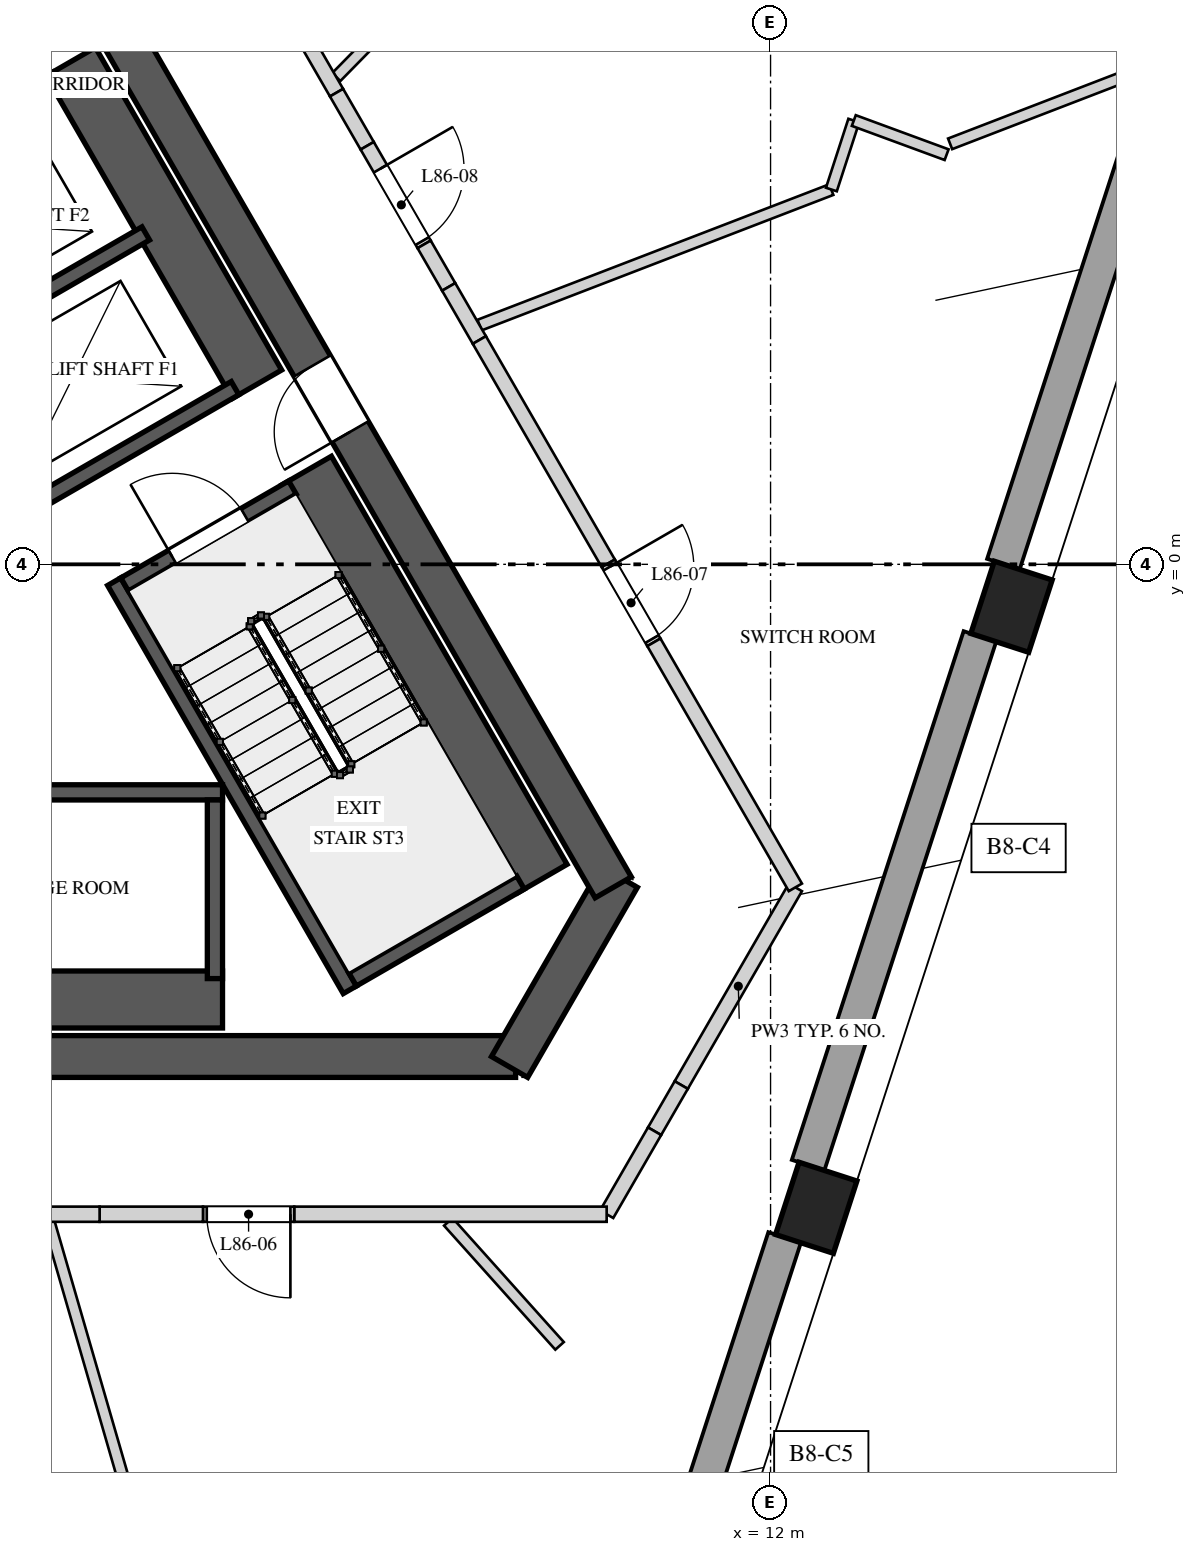
"""IFC4 building model, lengths in metres.
Left out: names, types, materials, properties, quantities, classifications, styles, units other than length and angle.
Written with IfcOpenShell. Run it as: python <this file> out.ifc"""

import sys

from ifc_helpers import new_model, si_unit, direction, frame, frame_2d, origin, origin_2d, place, context, subcontext, project, spatial, polyline, rectangle, outline, extrude, element, fill, save


model = new_model("IFC4")
c1 = context("Model", 3, precision=1e-05, world=origin(), true_north=direction((0.0, 1.0)))
c2 = subcontext(c1, "Body", "Model", "MODEL_VIEW")
j1 = project(units=[si_unit("LENGTHUNIT", "METRE"), si_unit("PLANEANGLEUNIT", "RADIAN")], contexts=[c1])
p1 = place(None, origin())
s1 = spatial("IfcSite", under=j1, at=p1, CompositionType="ELEMENT")
p2 = place(p1, origin())
s2 = spatial("IfcBuilding", under=s1, at=p2, CompositionType="ELEMENT")
p3 = place(p2, frame((0.0, 0.0, 374.9)))
s3 = spatial("IfcBuildingStorey", under=s2, at=p3, CompositionType="ELEMENT", Elevation=374.9)
p4 = place(p3, frame((-8.646, -6.475, 0.0), z_axis=(0.0, 0.0, 1.0), x_axis=(1.0, 0.0, 0.0)))
e1 = element("IfcWall", 1, at=p4, inside=s3, PredefinedType="SHEAR", context=c2, shape_type="SweptSolid", body=[
    extrude(rectangle(XDim=17.292, YDim=0.55, at=frame_2d((8.646, 0.0))), origin(), (0.0, 0.0, 1.0), 6.0),
])
p5 = place(p4, frame((6.851, 0.0, 0.0)))
e2 = element("IfcOpeningElement", 2, at=p5, cuts=e1, PredefinedType="OPENING", context=c2, shape_type="SweptSolid", body=[
    extrude(rectangle(XDim=1.0, YDim=2.4, at=frame_2d((0.5, 1.2))), frame((0.0, 0.285, 0.0), z_axis=(0.0, -1.0, 0.0), x_axis=(1.0, 0.0, 0.0)), (0.0, 0.0, 1.0), 0.57),
])
p6 = place(p3, frame((8.566, -6.613, 0.0), z_axis=(0.0, 0.0, 1.0), x_axis=(0.499995765644, 0.866027848477, 0.0)))
e3 = element("IfcWall", 3, at=p6, inside=s3, PredefinedType="SHEAR", context=c2, shape_type="SweptSolid", body=[
    extrude(rectangle(XDim=2.887, YDim=0.55, at=frame_2d((1.443, 0.0))), origin(), (0.0, 0.0, 1.0), 6.0),
])
p7 = place(p3, frame((9.93, -4.25, 0.0), z_axis=(0.0, 0.0, 1.0), x_axis=(-0.499994590896, 0.86602852671, 0.0)))
e4 = element("IfcWall", 4, at=p7, inside=s3, PredefinedType="SHEAR", context=c2, shape_type="SweptSolid", body=[
    extrude(rectangle(XDim=17.292, YDim=0.55, at=frame_2d((8.646, 0.0))), origin(), (0.0, 0.0, 1.0), 6.0),
])
p8 = place(p7, frame((6.921, 0.0, 0.0)))
e5 = element("IfcOpeningElement", 5, at=p8, cuts=e4, PredefinedType="OPENING", context=c2, shape_type="SweptSolid", body=[
    extrude(rectangle(XDim=1.0, YDim=2.4, at=frame_2d((0.5, 1.2))), frame((0.0, 0.285, 0.0), z_axis=(0.0, -1.0, 0.0), x_axis=(1.0, 0.0, 0.0)), (0.0, 0.0, 1.0), 0.57),
])
for number, where, z_axis, x_axis in (
    (6, (12.601, -8.465, 0.0), (0.0, 0.0, 1.0), (0.309, 0.951, 0.0)),
    (7, (15.17, -0.558, 0.0), (0.0, 0.0, 1.0), (0.309, 0.951, 0.0)),
):
    element("IfcColumn", number, at=place(p3, frame(where, z_axis=z_axis, x_axis=x_axis)), inside=s3, PredefinedType="COLUMN", context=c2, shape_type="SweptSolid", body=[
        extrude(rectangle(XDim=1.0, YDim=0.8, at=origin_2d()), origin(), (0.0, 0.0, 1.0), 6.0),
    ])
for number, where, z_axis, x_axis in (
    (8, (9.925, -15.812, 0.0), (0.0, 0.0, 1.0), (0.309, 0.951, 0.0)),
    (9, (12.494, -7.905, 0.0), (0.0, 0.0, 1.0), (0.309, 0.951, 0.0)),
    (10, (15.063, 0.002, 0.0), (0.0, 0.0, 1.0), (0.309, 0.951, 0.0)),
):
    element("IfcWall", number, at=place(p3, frame(where, z_axis=z_axis, x_axis=x_axis)), inside=s3, PredefinedType="SOLIDWALL", context=c2, shape_type="SweptSolid", body=[
        extrude(rectangle(XDim=7.314, YDim=0.45, at=frame_2d((3.657, 0.0))), origin(), (0.0, 0.0, 1.0), 5.3),
    ])
p9 = place(p3, frame((8.998, -4.135, 0.0), z_axis=(0.0, 0.0, 1.0), x_axis=(-0.500009909098, 0.866019682689, 0.0)))
e11 = element("IfcWall", 11, at=p9, inside=s3, PredefinedType="SOLIDWALL", context=c2, shape_type="SweptSolid", body=[
    extrude(rectangle(XDim=6.2, YDim=0.75, at=frame_2d((3.1, 0.0))), origin(), (0.0, 0.0, 1.0), 5.65),
])
p10 = place(p3, frame((6.465, -5.597, 0.0), z_axis=(0.0, 0.0, 1.0), x_axis=(-0.49998037582, 0.866036733513, 0.0)))
e12 = element("IfcWall", 12, at=p10, inside=s3, PredefinedType="SOLIDWALL", context=c2, shape_type="SweptSolid", body=[
    extrude(rectangle(XDim=6.2, YDim=0.2, at=frame_2d((3.1, 0.0))), origin(), (0.0, 0.0, 1.0), 5.65),
])
p11 = place(p3, frame((6.501, -5.461, 0.0), z_axis=(0.0, 0.0, 1.0), x_axis=(0.865989465428, 0.500062241894, 0.0)))
e13 = element("IfcWall", 13, at=p11, inside=s3, PredefinedType="SOLIDWALL", context=c2, shape_type="SweptSolid", body=[
    extrude(rectangle(XDim=2.55, YDim=0.2, at=frame_2d((1.275, 0.0))), origin(), (0.0, 0.0, 1.0), 5.65),
])
p12 = place(p3, frame((3.501, -0.265, 0.0), z_axis=(0.0, 0.0, 1.0), x_axis=(0.866030925526, 0.499990435942, 0.0)))
e14 = element("IfcWall", 14, at=p12, inside=s3, PredefinedType="SOLIDWALL", context=c2, shape_type="SweptSolid", body=[
    extrude(rectangle(XDim=2.55, YDim=0.2, at=frame_2d((1.275, 0.0))), origin(), (0.0, 0.0, 1.0), 5.65),
])
p13 = place(p12, frame((0.725, 0.0, 0.0)))
e15 = element("IfcOpeningElement", 15, at=p13, cuts=e14, PredefinedType="OPENING", context=c2, shape_type="SweptSolid", body=[
    extrude(rectangle(XDim=1.1, YDim=2.4, at=frame_2d((0.55, 1.2))), frame((0.0, 0.11, 0.0), z_axis=(0.0, -1.0, 0.0), x_axis=(1.0, 0.0, 0.0)), (0.0, 0.0, 1.0), 0.22),
])
p14 = place(p3, frame((4.79, -3.0, 0.0), z_axis=(0.0, 0.0, 1.0), x_axis=(-1.0, 0.0, 0.0)))
e16 = element("IfcWall", 16, at=p14, inside=s3, PredefinedType="SOLIDWALL", context=c2, shape_type="SweptSolid", body=[
    extrude(rectangle(XDim=5.5, YDim=0.2, at=frame_2d((2.75, 0.0))), origin(), (0.0, 0.0, 1.0), 5.65),
])
p15 = place(p14, frame((2.275, 0.0, 0.0)))
e17 = element("IfcOpeningElement", 17, at=p15, cuts=e16, PredefinedType="OPENING", context=c2, shape_type="SweptSolid", body=[
    extrude(rectangle(XDim=0.95, YDim=2.4, at=frame_2d((0.475, 1.2))), frame((0.0, 0.11, 0.0), z_axis=(0.0, -1.0, 0.0), x_axis=(1.0, 0.0, 0.0)), (0.0, 0.0, 1.0), 0.22),
])
p16 = place(p3, frame((-0.71, -5.725, 0.0), z_axis=(0.0, 0.0, 1.0), x_axis=(1.0, 0.0, 0.0)))
e18 = element("IfcWall", 18, at=p16, inside=s3, PredefinedType="SOLIDWALL", context=c2, shape_type="SweptSolid", body=[
    extrude(rectangle(XDim=5.5, YDim=0.75, at=frame_2d((2.75, 0.0))), origin(), (0.0, 0.0, 1.0), 5.65),
])
p17 = place(p3, frame((4.69, -3.1, 0.0), z_axis=(0.0, 0.0, 1.0), x_axis=(0.0, -1.0, 0.0)))
e19 = element("IfcWall", 19, at=p17, inside=s3, PredefinedType="SOLIDWALL", context=c2, shape_type="SweptSolid", body=[
    extrude(rectangle(XDim=2.35, YDim=0.2, at=frame_2d((1.175, 0.0))), origin(), (0.0, 0.0, 1.0), 5.65),
])
p18 = place(p3, frame((5.243, 2.369, 0.0), z_axis=(0.0, 0.0, 1.0), x_axis=(-0.500002801628, 0.866023786258, 0.0)))
e20 = element("IfcWall", 20, at=p18, inside=s3, PredefinedType="SOLIDWALL", context=c2, shape_type="SweptSolid", body=[
    extrude(rectangle(XDim=4.9, YDim=0.75, at=frame_2d((2.45, 0.0))), origin(), (0.0, 0.0, 1.0), 5.65),
])
for number, where, z_axis, x_axis in (
    (21, (2.227, 0.743, 0.0), (0.0, 0.0, 1.0), (0.866, 0.5, 0.0)),
    (22, (1.052, 2.778, 0.0), (0.0, 0.0, 1.0), (0.866, 0.5, 0.0)),
    (23, (-0.123, 4.813, 0.0), (0.0, 0.0, 1.0), (0.866, 0.5, 0.0)),
):
    element("IfcWall", number, at=place(p3, frame(where, z_axis=z_axis, x_axis=x_axis)), inside=s3, PredefinedType="SOLIDWALL", context=c2, shape_type="SweptSolid", body=[
        extrude(rectangle(XDim=3.15, YDim=0.2, at=frame_2d((1.575, 0.0))), origin(), (0.0, 0.0, 1.0), 5.65),
    ])
p19 = place(p3, frame((2.505, -8.65, 0.0), z_axis=(0.0, 0.0, 1.0), x_axis=(0.278185386407, -0.960527402415, 0.0)))
e24 = element("IfcWall", 24, at=p19, inside=s3, PredefinedType="PARTITIONING", context=c2, shape_type="SweptSolid", body=[
    extrude(rectangle(XDim=9.173, YDim=0.15, at=frame_2d((4.586, 0.0))), origin(), (0.0, 0.0, 1.0), 4.55),
])
p20 = place(p3, frame((6.287, 6.411, 0.0), z_axis=(0.0, 0.0, 1.0), x_axis=(0.700152348121, 0.713993479956, 0.0)))
e25 = element("IfcWall", 25, at=p20, inside=s3, PredefinedType="PARTITIONING", context=c2, shape_type="SweptSolid", body=[
    extrude(rectangle(XDim=3.74, YDim=0.15, at=frame_2d((1.87, 0.0))), origin(), (0.0, 0.0, 1.0), 4.55),
])
p21 = place(p3, frame((7.76, -8.65, 0.0), z_axis=(0.0, 0.0, 1.0), x_axis=(0.667813245051, -0.744328872028, 0.0)))
e26 = element("IfcWall", 26, at=p21, inside=s3, PredefinedType="PARTITIONING", context=c2, shape_type="SweptSolid", body=[
    extrude(rectangle(XDim=2.192, YDim=0.15, at=frame_2d((1.096, 0.0))), origin(), (0.0, 0.0, 1.0), 5.65),
])
p22 = place(p3, frame((8.171, 3.147, 0.0), z_axis=(0.0, 0.0, 1.0), x_axis=(0.933160243697, 0.359460650953, 0.0)))
e27 = element("IfcWall", 27, at=p22, inside=s3, PredefinedType="PARTITIONING", context=c2, shape_type="SweptSolid", body=[
    extrude(rectangle(XDim=4.959, YDim=0.15, at=frame_2d((2.48, 0.0))), origin(), (0.0, 0.0, 1.0), 4.75),
])
p23 = place(p3, frame((12.8, 4.931, 0.0), z_axis=(0.0, 0.0, 1.0), x_axis=(0.30908028689, 0.951035948982, 0.0)))
e28 = element("IfcWall", 28, at=p23, inside=s3, PredefinedType="PARTITIONING", context=c2, shape_type="SweptSolid", body=[
    extrude(rectangle(XDim=0.954, YDim=0.15, at=frame_2d((0.477, 0.0))), origin(), (0.0, 0.0, 1.0), 4.75),
])
p24 = place(p3, frame((13.095, 5.839, 0.0), z_axis=(0.0, 0.0, 1.0), x_axis=(0.938493614459, -0.345296590803, 0.0)))
e29 = element("IfcWall", 29, at=p24, inside=s3, PredefinedType="PARTITIONING", context=c2, shape_type="SweptSolid", body=[
    extrude(rectangle(XDim=1.301, YDim=0.15, at=frame_2d((0.65, 0.0))), origin(), (0.0, 0.0, 1.0), 4.75),
])
p25 = place(p3, frame((14.363, 5.532, 0.0), z_axis=(0.0, 0.0, 1.0), x_axis=(0.933150029703, 0.359487165369, 0.0)))
e30 = element("IfcWall", 30, at=p25, inside=s3, PredefinedType="PARTITIONING", context=c2, shape_type="SweptSolid", body=[
    extrude(rectangle(XDim=2.769, YDim=0.15, at=frame_2d((1.384, 0.0))), origin(), (0.0, 0.0, 1.0), 5.65),
])
p26 = place(p3, frame((12.326, -4.25, 0.0), z_axis=(0.0, 0.0, 1.0), x_axis=(-0.500003959331, -0.866023117852, 0.0)))
e31 = element("IfcWall", 31, at=p26, inside=s3, PredefinedType="SOLIDWALL", context=c2, shape_type="SweptSolid", body=[
    extrude(rectangle(XDim=3.003, YDim=0.2, at=frame_2d((1.501, 0.0))), origin(), (0.0, 0.0, 1.0), 5.65),
])
p27 = place(p3, frame((10.825, -6.851, 0.0), z_axis=(0.0, 0.0, 1.0), x_axis=(-0.500144223137, -0.865942120504, 0.0)))
e32 = element("IfcWall", 32, at=p27, inside=s3, PredefinedType="SOLIDWALL", context=c2, shape_type="SweptSolid", body=[
    extrude(rectangle(XDim=0.701, YDim=0.2, at=frame_2d((0.351, 0.0))), origin(), (0.0, 0.0, 1.0), 4.95),
])
p28 = place(p3, frame((10.474, -7.458, 0.0), z_axis=(0.0, 0.0, 1.0), x_axis=(-0.499929168788, -0.866066294342, 0.0)))
e33 = element("IfcWall", 33, at=p28, inside=s3, PredefinedType="SOLIDWALL", context=c2, shape_type="SweptSolid", body=[
    extrude(rectangle(XDim=1.261, YDim=0.2, at=frame_2d((0.63, 0.0))), origin(), (0.0, 0.0, 1.0), 5.65),
])
p29 = place(p3, frame((9.844, -8.55, 0.0), z_axis=(0.0, 0.0, 1.0), x_axis=(-1.0, 0.0, 0.0)))
e34 = element("IfcWall", 34, at=p29, inside=s3, PredefinedType="SOLIDWALL", context=c2, shape_type="SweptSolid", body=[
    extrude(rectangle(XDim=4.111, YDim=0.2, at=frame_2d((2.055, 0.0))), origin(), (0.0, 0.0, 1.0), 5.65),
])
p30 = place(p3, frame((5.733, -8.55, 0.0), z_axis=(0.0, 0.0, 1.0), x_axis=(-1.0, 0.0, 0.0)))
e35 = element("IfcWall", 35, at=p30, inside=s3, PredefinedType="SOLIDWALL", context=c2, shape_type="SweptSolid", body=[
    extrude(outline(polyline([(0.0, 0.0), (1.2, 0.0), (1.2, 5.65), (0.905, 5.65), (0.905, 4.95), (0.0, 4.95), (0.0, 0.0)])), frame((0.0, 0.1, 0.0), z_axis=(0.0, -1.0, 0.0), x_axis=(1.0, 0.0, 0.0)), (0.0, 0.0, 1.0), 0.2),
])
p31 = place(p30, frame((0.05, 0.0, 0.0)))
e36 = element("IfcOpeningElement", 36, at=p31, cuts=e35, PredefinedType="OPENING", context=c2, shape_type="SweptSolid", body=[
    extrude(rectangle(XDim=1.1, YDim=2.4, at=frame_2d((0.55, 1.2))), frame((0.0, 0.11, 0.0), z_axis=(0.0, -1.0, 0.0), x_axis=(1.0, 0.0, 0.0)), (0.0, 0.0, 1.0), 0.22),
])
p32 = place(p3, frame((4.533, -8.55, 0.0), z_axis=(0.0, 0.0, 1.0), x_axis=(-1.0, 0.0, 0.0)))
e37 = element("IfcWall", 37, at=p32, inside=s3, PredefinedType="SOLIDWALL", context=c2, shape_type="SweptSolid", body=[
    extrude(rectangle(XDim=1.36, YDim=0.2, at=frame_2d((0.68, 0.0))), origin(), (0.0, 0.0, 1.0), 5.65),
])
for number, where, z_axis, x_axis in (
    (38, (3.173, -8.55, 0.0), (0.0, 0.0, 1.0), (-1.0, 0.0, 0.0)),
    (39, (5.818, 7.023, 0.0), (0.0, 0.0, 1.0), (0.5, -0.866, 0.0)),
):
    element("IfcWall", number, at=place(p3, frame(where, z_axis=z_axis, x_axis=x_axis)), inside=s3, PredefinedType="SOLIDWALL", context=c2, shape_type="SweptSolid", body=[
        extrude(rectangle(XDim=0.944, YDim=0.2, at=frame_2d((0.472, 0.0))), origin(), (0.0, 0.0, 1.0), 4.55),
    ])
p33 = place(p3, frame((6.29, 6.205, 0.0), z_axis=(0.0, 0.0, 1.0), x_axis=(0.500045602705, -0.86599907345, 0.0)))
e40 = element("IfcWall", 40, at=p33, inside=s3, PredefinedType="SOLIDWALL", context=c2, shape_type="SweptSolid", body=[
    extrude(rectangle(XDim=0.807, YDim=0.2, at=frame_2d((0.403, 0.0))), origin(), (0.0, 0.0, 1.0), 5.65),
])
p34 = place(p3, frame((6.693, 5.507, 0.0), z_axis=(0.0, 0.0, 1.0), x_axis=(0.499995192696, -0.866028179265, 0.0)))
e41 = element("IfcWall", 41, at=p34, inside=s3, PredefinedType="SOLIDWALL", context=c2, shape_type="SweptSolid", body=[
    extrude(outline(polyline([(0.0, 0.0), (1.498, 0.0), (1.498, 5.65), (0.906, 5.65), (0.906, 4.55), (0.0, 4.55), (0.0, 0.0)])), frame((0.0, 0.1, 0.0), z_axis=(0.0, -1.0, 0.0), x_axis=(1.0, 0.0, 0.0)), (0.0, 0.0, 1.0), 0.2),
])
p35 = place(p34, frame((0.348, 0.0, 0.0)))
e42 = element("IfcOpeningElement", 42, at=p35, cuts=e41, PredefinedType="OPENING", context=c2, shape_type="SweptSolid", body=[
    extrude(rectangle(XDim=1.1, YDim=2.4, at=frame_2d((0.55, 1.2))), frame((0.0, 0.11, 0.0), z_axis=(0.0, -1.0, 0.0), x_axis=(1.0, 0.0, 0.0)), (0.0, 0.0, 1.0), 0.22),
])
p36 = place(p3, frame((7.442, 4.209, 0.0), z_axis=(0.0, 0.0, 1.0), x_axis=(0.499918713684, -0.866072329375, 0.0)))
e43 = element("IfcWall", 43, at=p36, inside=s3, PredefinedType="SOLIDWALL", context=c2, shape_type="SweptSolid", body=[
    extrude(rectangle(XDim=0.646, YDim=0.2, at=frame_2d((0.323, 0.0))), origin(), (0.0, 0.0, 1.0), 5.65),
])
p37 = place(p3, frame((7.765, 3.65, 0.0), z_axis=(0.0, 0.0, 1.0), x_axis=(0.500141487433, -0.865943700565, 0.0)))
e44 = element("IfcWall", 44, at=p37, inside=s3, PredefinedType="SOLIDWALL", context=c2, shape_type="SweptSolid", body=[
    extrude(rectangle(XDim=0.807, YDim=0.2, at=frame_2d((0.403, 0.0))), origin(), (0.0, 0.0, 1.0), 4.75),
])
p38 = place(p3, frame((8.169, 2.951, 0.0), z_axis=(0.0, 0.0, 1.0), x_axis=(0.499955030392, -0.866051365443, 0.0)))
e45 = element("IfcWall", 45, at=p38, inside=s3, PredefinedType="SOLIDWALL", context=c2, shape_type="SweptSolid", body=[
    extrude(rectangle(XDim=3.392, YDim=0.2, at=frame_2d((1.696, 0.0))), origin(), (0.0, 0.0, 1.0), 5.65),
])
p39 = place(p3, frame((9.865, 0.013, 0.0), z_axis=(0.0, 0.0, 1.0), x_axis=(0.50012165622, -0.865955154139, 0.0)))
e46 = element("IfcWall", 46, at=p39, inside=s3, PredefinedType="SOLIDWALL", context=c2, shape_type="SweptSolid", body=[
    extrude(outline(polyline([(0.0, 0.0), (1.2, 0.0), (1.2, 5.65), (0.857, 5.65), (0.857, 4.95), (0.0, 4.95), (0.0, 0.0)])), frame((0.0, 0.1, 0.0), z_axis=(0.0, -1.0, 0.0), x_axis=(1.0, 0.0, 0.0)), (0.0, 0.0, 1.0), 0.2),
])
p40 = place(p39, frame((0.05, 0.0, 0.0)))
e47 = element("IfcOpeningElement", 47, at=p40, cuts=e46, PredefinedType="OPENING", context=c2, shape_type="SweptSolid", body=[
    extrude(rectangle(XDim=1.1, YDim=2.4, at=frame_2d((0.55, 1.2))), frame((0.0, 0.11, 0.0), z_axis=(0.0, -1.0, 0.0), x_axis=(1.0, 0.0, 0.0)), (0.0, 0.0, 1.0), 0.22),
])
p41 = place(p3, frame((10.465, -1.026, 0.0), z_axis=(0.0, 0.0, 1.0), x_axis=(0.499976014784, -0.866039251212, 0.0)))
e48 = element("IfcWall", 48, at=p41, inside=s3, PredefinedType="SOLIDWALL", context=c2, shape_type="SweptSolid", body=[
    extrude(rectangle(XDim=3.723, YDim=0.2, at=frame_2d((1.861, 0.0))), origin(), (0.0, 0.0, 1.0), 5.65),
])
p42 = place(p13, origin())
e49 = element("IfcDoor", 49, at=p42, inside=s3, OperationType="SINGLE_SWING_RIGHT", PredefinedType="DOOR", context=c2, shape_type="SweptSolid", body=[
    extrude(rectangle(XDim=1.1, YDim=2.4, at=frame_2d((0.55, 1.2))), frame((0.0, 0.025, 0.0), z_axis=(0.0, -1.0, 0.0), x_axis=(1.0, 0.0, 0.0)), (0.0, 0.0, 1.0), 0.05),
])
fill(e15, e49)
p43 = place(p8, origin())
e50 = element("IfcDoor", 50, at=p43, inside=s3, OperationType="SINGLE_SWING_RIGHT", PredefinedType="DOOR", context=c2, shape_type="SweptSolid", body=[
    extrude(rectangle(XDim=1.0, YDim=2.4, at=frame_2d((0.5, 1.2))), frame((0.0, 0.025, 0.0), z_axis=(0.0, -1.0, 0.0), x_axis=(1.0, 0.0, 0.0)), (0.0, 0.0, 1.0), 0.05),
])
fill(e5, e50)
p44 = place(p31, origin())
e51 = element("IfcDoor", 51, at=p44, inside=s3, OperationType="SINGLE_SWING_LEFT", PredefinedType="DOOR", context=c2, shape_type="SweptSolid", body=[
    extrude(rectangle(XDim=1.1, YDim=2.4, at=frame_2d((0.55, 1.2))), frame((0.0, 0.025, 0.0), z_axis=(0.0, -1.0, 0.0), x_axis=(1.0, 0.0, 0.0)), (0.0, 0.0, 1.0), 0.05),
])
fill(e36, e51)
p45 = place(p40, origin())
e52 = element("IfcDoor", 52, at=p45, inside=s3, OperationType="SINGLE_SWING_RIGHT", PredefinedType="DOOR", context=c2, shape_type="SweptSolid", body=[
    extrude(rectangle(XDim=1.1, YDim=2.4, at=frame_2d((0.55, 1.2))), frame((0.0, 0.025, 0.0), z_axis=(0.0, -1.0, 0.0), x_axis=(1.0, 0.0, 0.0)), (0.0, 0.0, 1.0), 0.05),
])
fill(e47, e52)
p46 = place(p35, origin())
e53 = element("IfcDoor", 53, at=p46, inside=s3, OperationType="SINGLE_SWING_LEFT", PredefinedType="DOOR", context=c2, shape_type="SweptSolid", body=[
    extrude(rectangle(XDim=1.1, YDim=2.4, at=frame_2d((0.55, 1.2))), frame((0.0, 0.025, 0.0), z_axis=(0.0, -1.0, 0.0), x_axis=(1.0, 0.0, 0.0)), (0.0, 0.0, 1.0), 0.05),
])
fill(e42, e53)
save(model, sys.argv[1])
